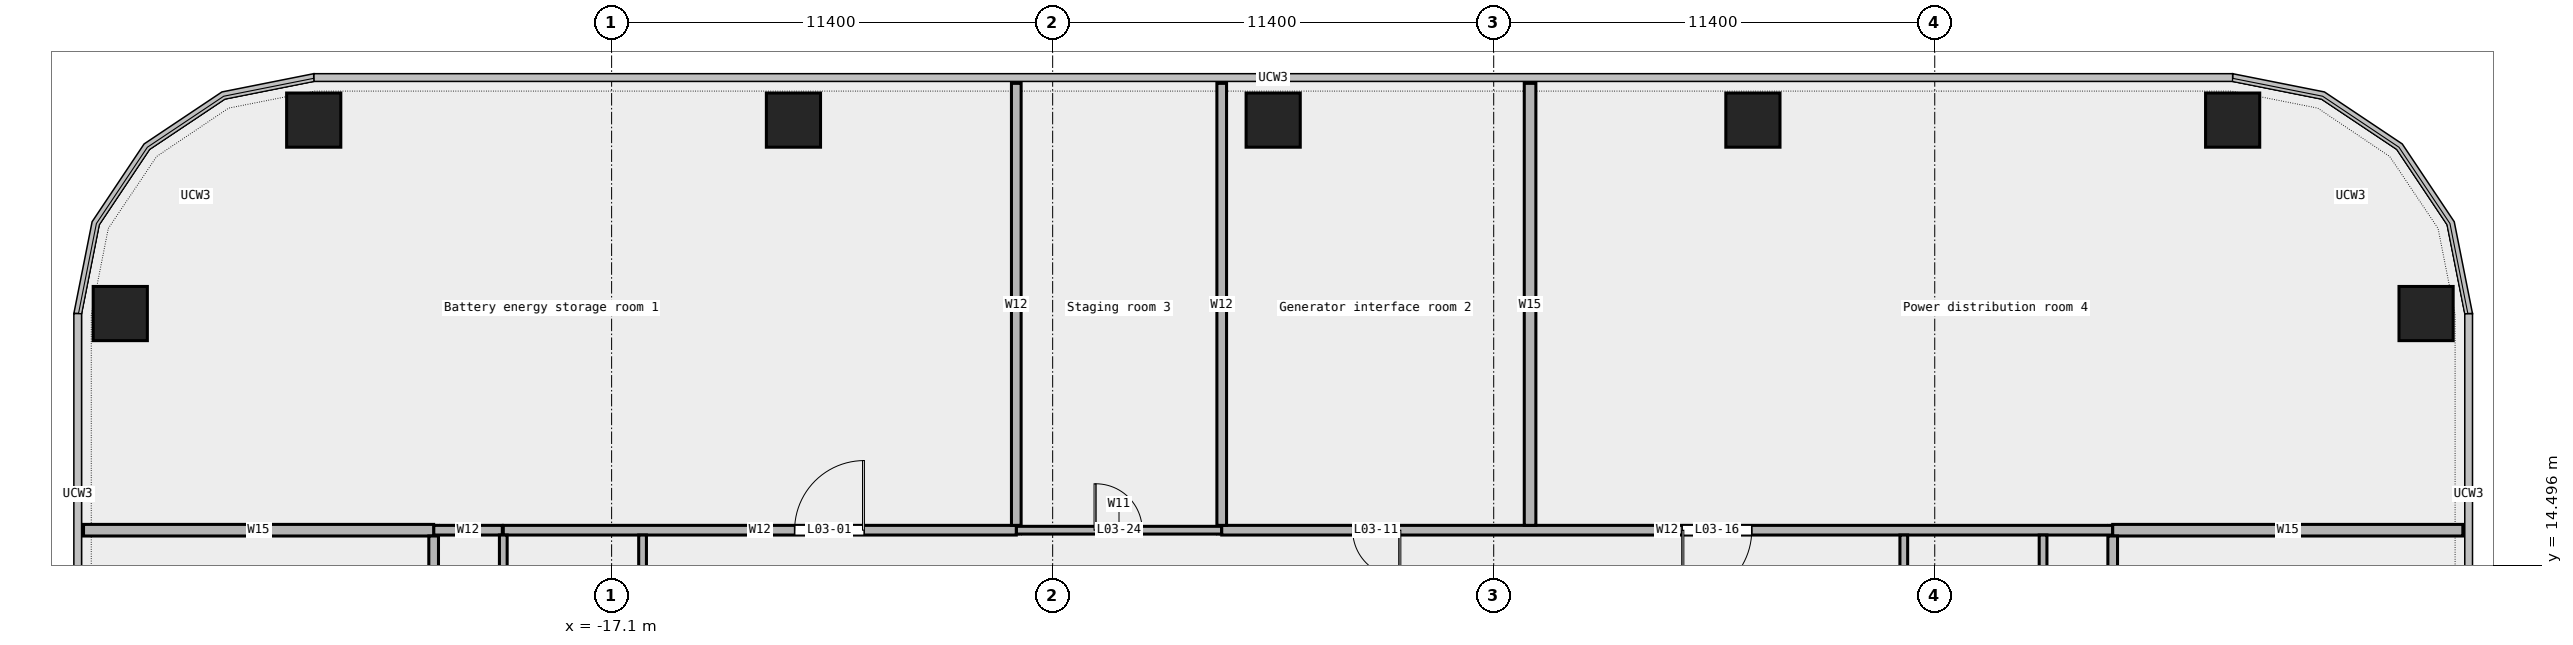
"""IFC4 building model, lengths in metres.
Left out: names, types, materials, properties, quantities, classifications, styles, units other than length and angle.
Written with IfcOpenShell. Run it as: python <this file> out.ifc"""

import sys

from ifc_helpers import new_model, si_unit, direction, frame, frame_2d, origin, origin_2d, place, context, subcontext, project, spatial, rectangle, extrude, element, fill, save


model = new_model("IFC4")
c1 = context("Model", 3, precision=1e-05, world=origin(), true_north=direction((0.0, 1.0)))
c2 = subcontext(c1, "Body", "Model", "MODEL_VIEW")
j1 = project(units=[si_unit("LENGTHUNIT", "METRE"), si_unit("PLANEANGLEUNIT", "RADIAN")], contexts=[c1])
p1 = place(None, origin())
s1 = spatial("IfcSite", under=j1, at=p1, CompositionType="ELEMENT")
p2 = place(p1, origin())
s2 = spatial("IfcBuilding", under=s1, at=p2, CompositionType="ELEMENT")
p3 = place(p2, frame((0.0, 0.0, 20.0)))
s3 = spatial("IfcBuildingStorey", under=s2, at=p3, CompositionType="ELEMENT", Elevation=20.0)
for number, where, z_axis, x_axis in (
    (1, (29.8, 21.0, 0.0), (0.0, 0.0, 1.0), (1.0, 0.0, 0.0)),
    (2, (24.8, 26.0, 0.0), (0.0, 0.0, 1.0), (1.0, 0.0, 0.0)),
    (3, (12.4, 26.0, 0.0), (0.0, 0.0, 1.0), (1.0, 0.0, 0.0)),
    (4, (0.0, 26.0, 0.0), (0.0, 0.0, 1.0), (1.0, 0.0, 0.0)),
    (5, (-12.4, 26.0, 0.0), (0.0, 0.0, 1.0), (1.0, 0.0, 0.0)),
    (6, (-24.8, 26.0, 0.0), (0.0, 0.0, 1.0), (1.0, 0.0, 0.0)),
    (7, (-29.8, 21.0, 0.0), (0.0, 0.0, 1.0), (1.0, 0.0, 0.0)),
):
    element("IfcColumn", number, at=place(p3, frame(where, z_axis=z_axis, x_axis=x_axis)), inside=s3, PredefinedType="COLUMN", context=c2, shape_type="SweptSolid", body=[
        extrude(rectangle(XDim=1.4, YDim=1.4, at=origin_2d()), origin(), (0.0, 0.0, 1.0), 5.0),
    ])
p4 = place(p3, frame((-6.64, 15.4, 0.0), z_axis=(0.0, 0.0, 1.0), x_axis=(1.0, 0.0, 0.0)))
e8 = element("IfcWall", 8, at=p4, inside=s3, PredefinedType="PARTITIONING", context=c2, shape_type="SweptSolid", body=[
    extrude(rectangle(XDim=5.31, YDim=0.2, at=frame_2d((2.655, 0.0))), origin(), (0.0, 0.0, 1.0), 5.0),
])
p5 = place(p4, frame((2.055, 0.0, 0.0)))
e9 = element("IfcOpeningElement", 9, at=p5, cuts=e8, PredefinedType="OPENING", context=c2, shape_type="SweptSolid", body=[
    extrude(rectangle(XDim=1.2, YDim=2.1, at=frame_2d((0.6, 1.05))), frame((0.0, 0.112, 0.0), z_axis=(0.0, -1.0, 0.0), x_axis=(1.0, 0.0, 0.0)), (0.0, 0.0, 1.0), 0.224),
])
p6 = place(p3, frame((-21.7, 15.4, 0.0), z_axis=(0.0, 0.0, 1.0), x_axis=(1.0, 0.0, 0.0)))
e10 = element("IfcWall", 10, at=p6, inside=s3, PredefinedType="PARTITIONING", context=c2, shape_type="SweptSolid", body=[
    extrude(rectangle(XDim=1.775, YDim=0.25, at=frame_2d((0.887, 0.0))), origin(), (0.0, 0.0, 1.0), 5.0),
])
p7 = place(p3, frame((-19.9, 15.4, 0.0), z_axis=(0.0, 0.0, 1.0), x_axis=(1.0, 0.0, 0.0)))
e11 = element("IfcWall", 11, at=p7, inside=s3, PredefinedType="PARTITIONING", context=c2, shape_type="SweptSolid", body=[
    extrude(rectangle(XDim=13.26, YDim=0.25, at=frame_2d((6.63, 0.0))), origin(), (0.0, 0.0, 1.0), 5.0),
])
p8 = place(p7, frame((7.53, 0.0, 0.0)))
e12 = element("IfcOpeningElement", 12, at=p8, cuts=e11, PredefinedType="OPENING", context=c2, shape_type="SweptSolid", body=[
    extrude(rectangle(XDim=1.8, YDim=2.1, at=frame_2d((0.9, 1.05))), frame((0.0, 0.137, 0.0), z_axis=(0.0, -1.0, 0.0), x_axis=(1.0, 0.0, 0.0)), (0.0, 0.0, 1.0), 0.274),
])
p9 = place(p3, frame((-1.33, 15.4, 0.0), z_axis=(0.0, 0.0, 1.0), x_axis=(1.0, 0.0, 0.0)))
e13 = element("IfcWall", 13, at=p9, inside=s3, PredefinedType="PARTITIONING", context=c2, shape_type="SweptSolid", body=[
    extrude(rectangle(XDim=23.03, YDim=0.25, at=frame_2d((11.515, 0.0))), origin(), (0.0, 0.0, 1.0), 5.0),
])
p10 = place(p9, frame((3.385, 0.0, 0.0)))
e14 = element("IfcOpeningElement", 14, at=p10, cuts=e13, PredefinedType="OPENING", context=c2, shape_type="SweptSolid", body=[
    extrude(rectangle(XDim=1.2, YDim=2.1, at=frame_2d((0.6, 1.05))), frame((0.0, 0.137, 0.0), z_axis=(0.0, -1.0, 0.0), x_axis=(1.0, 0.0, 0.0)), (0.0, 0.0, 1.0), 0.274),
])
p11 = place(p9, frame((11.9, 0.0, 0.0)))
e15 = element("IfcOpeningElement", 15, at=p11, cuts=e13, PredefinedType="OPENING", context=c2, shape_type="SweptSolid", body=[
    extrude(rectangle(XDim=1.8, YDim=2.1, at=frame_2d((0.9, 1.05))), frame((0.0, 0.137, 0.0), z_axis=(0.0, -1.0, 0.0), x_axis=(1.0, 0.0, 0.0)), (0.0, 0.0, 1.0), 0.274),
])
for number, where, z_axis, x_axis in (
    (16, (-30.75, 15.4, 0.0), (0.0, 0.0, 1.0), (1.0, 0.0, 0.0)),
    (17, (21.7, 15.4, 0.0), (0.0, 0.0, 1.0), (1.0, 0.0, 0.0)),
):
    element("IfcWall", number, at=place(p3, frame(where, z_axis=z_axis, x_axis=x_axis)), inside=s3, PredefinedType="PARTITIONING", context=c2, shape_type="SweptSolid", body=[
        extrude(rectangle(XDim=9.05, YDim=0.3, at=frame_2d((4.525, 0.0))), origin(), (0.0, 0.0, 1.0), 5.0),
    ])
p12 = place(p3, frame((-21.7, 11.79, 0.0), z_axis=(0.0, 0.0, 1.0), x_axis=(0.0, 1.0, 0.0)))
e18 = element("IfcWall", 18, at=p12, inside=s3, PredefinedType="PARTITIONING", context=c2, shape_type="SweptSolid", body=[
    extrude(rectangle(XDim=3.46, YDim=0.25, at=frame_2d((1.73, 0.0))), origin(), (0.0, 0.0, 1.0), 5.0),
])
p13 = place(p12, frame((1.13, 0.0, 0.0)))
e19 = element("IfcOpeningElement", 19, at=p13, cuts=e18, PredefinedType="OPENING", context=c2, shape_type="SweptSolid", body=[
    extrude(rectangle(XDim=1.2, YDim=2.1, at=frame_2d((0.6, 1.05))), frame((0.0, 0.137, 0.0), z_axis=(0.0, -1.0, 0.0), x_axis=(1.0, 0.0, 0.0)), (0.0, 0.0, 1.0), 0.274),
])
p14 = place(p3, frame((-19.9, 9.85, 0.0), z_axis=(0.0, 0.0, 1.0), x_axis=(0.0, 1.0, 0.0)))
e20 = element("IfcWall", 20, at=p14, inside=s3, PredefinedType="PARTITIONING", context=c2, shape_type="SweptSolid", body=[
    extrude(rectangle(XDim=5.425, YDim=0.2, at=frame_2d((2.712, 0.0))), origin(), (0.0, 0.0, 1.0), 5.0),
])
p15 = place(p3, frame((-16.3, 11.8, 0.0), z_axis=(0.0, 0.0, 1.0), x_axis=(0.0, 1.0, 0.0)))
e21 = element("IfcWall", 21, at=p15, inside=s3, PredefinedType="PARTITIONING", context=c2, shape_type="SweptSolid", body=[
    extrude(rectangle(XDim=3.475, YDim=0.2, at=frame_2d((1.737, 0.0))), origin(), (0.0, 0.0, 1.0), 5.0),
])
p16 = place(p15, frame((1.288, 0.0, 0.0)))
e22 = element("IfcOpeningElement", 22, at=p16, cuts=e21, PredefinedType="OPENING", context=c2, shape_type="SweptSolid", body=[
    extrude(rectangle(XDim=0.9, YDim=2.1, at=frame_2d((0.45, 1.05))), frame((0.0, 0.112, 0.0), z_axis=(0.0, -1.0, 0.0), x_axis=(1.0, 0.0, 0.0)), (0.0, 0.0, 1.0), 0.224),
])
for number, where, z_axis, x_axis in (
    (23, (-6.64, 15.525, 0.0), (0.0, 0.0, 1.0), (0.0, 1.0, 0.0)),
    (24, (-1.33, 15.525, 0.0), (0.0, 0.0, 1.0), (0.0, 1.0, 0.0)),
):
    element("IfcWall", number, at=place(p3, frame(where, z_axis=z_axis, x_axis=x_axis)), inside=s3, PredefinedType="PARTITIONING", context=c2, shape_type="SweptSolid", body=[
        extrude(rectangle(XDim=11.425, YDim=0.25, at=frame_2d((5.712, 0.0))), origin(), (0.0, 0.0, 1.0), 5.0),
    ])
p17 = place(p3, frame((6.64, 15.525, 0.0), z_axis=(0.0, 0.0, 1.0), x_axis=(0.0, 1.0, 0.0)))
e25 = element("IfcWall", 25, at=p17, inside=s3, PredefinedType="PARTITIONING", context=c2, shape_type="SweptSolid", body=[
    extrude(rectangle(XDim=11.425, YDim=0.3, at=frame_2d((5.712, 0.0))), origin(), (0.0, 0.0, 1.0), 5.0),
])
p18 = place(p3, frame((16.3, 11.8, 0.0), z_axis=(0.0, 0.0, 1.0), x_axis=(0.0, 1.0, 0.0)))
e26 = element("IfcWall", 26, at=p18, inside=s3, PredefinedType="PARTITIONING", context=c2, shape_type="SweptSolid", body=[
    extrude(rectangle(XDim=3.475, YDim=0.2, at=frame_2d((1.737, 0.0))), origin(), (0.0, 0.0, 1.0), 5.0),
])
p19 = place(p3, frame((19.9, 9.94, 0.0), z_axis=(0.0, 0.0, 1.0), x_axis=(0.0, 1.0, 0.0)))
e27 = element("IfcWall", 27, at=p19, inside=s3, PredefinedType="PARTITIONING", context=c2, shape_type="SweptSolid", body=[
    extrude(rectangle(XDim=5.335, YDim=0.2, at=frame_2d((2.667, 0.0))), origin(), (0.0, 0.0, 1.0), 5.0),
])
p20 = place(p19, frame((2.218, 0.0, 0.0)))
e28 = element("IfcOpeningElement", 28, at=p20, cuts=e27, PredefinedType="OPENING", context=c2, shape_type="SweptSolid", body=[
    extrude(rectangle(XDim=0.9, YDim=2.1, at=frame_2d((0.45, 1.05))), frame((0.0, 0.112, 0.0), z_axis=(0.0, -1.0, 0.0), x_axis=(1.0, 0.0, 0.0)), (0.0, 0.0, 1.0), 0.224),
])
p21 = place(p3, frame((21.7, 11.79, 0.0), z_axis=(0.0, 0.0, 1.0), x_axis=(0.0, 1.0, 0.0)))
e29 = element("IfcWall", 29, at=p21, inside=s3, PredefinedType="PARTITIONING", context=c2, shape_type="SweptSolid", body=[
    extrude(rectangle(XDim=3.46, YDim=0.25, at=frame_2d((1.73, 0.0))), origin(), (0.0, 0.0, 1.0), 5.0),
])
p22 = place(p21, frame((1.13, 0.0, 0.0)))
e30 = element("IfcOpeningElement", 30, at=p22, cuts=e29, PredefinedType="OPENING", context=c2, shape_type="SweptSolid", body=[
    extrude(rectangle(XDim=1.2, YDim=2.1, at=frame_2d((0.6, 1.05))), frame((0.0, 0.137, 0.0), z_axis=(0.0, -1.0, 0.0), x_axis=(1.0, 0.0, 0.0)), (0.0, 0.0, 1.0), 0.274),
])
p23 = place(p8, origin())
e31 = element("IfcDoor", 31, at=p23, inside=s3, OperationType="DOUBLE_DOOR_SINGLE_SWING", PredefinedType="DOOR", context=c2, shape_type="SweptSolid", body=[
    extrude(rectangle(XDim=1.8, YDim=2.1, at=frame_2d((0.9, 1.05))), frame((0.0, 0.025, 0.0), z_axis=(0.0, -1.0, 0.0), x_axis=(1.0, 0.0, 0.0)), (0.0, 0.0, 1.0), 0.05),
])
fill(e12, e31)
p24 = place(p10, origin())
e32 = element("IfcDoor", 32, at=p24, inside=s3, OperationType="SINGLE_SWING_LEFT", PredefinedType="DOOR", context=c2, shape_type="SweptSolid", body=[
    extrude(rectangle(XDim=1.2, YDim=2.1, at=frame_2d((0.6, 1.05))), frame((0.0, 0.025, 0.0), z_axis=(0.0, -1.0, 0.0), x_axis=(1.0, 0.0, 0.0)), (0.0, 0.0, 1.0), 0.05),
])
fill(e14, e32)
p25 = place(p11, origin())
e33 = element("IfcDoor", 33, at=p25, inside=s3, OperationType="DOUBLE_DOOR_SINGLE_SWING", PredefinedType="DOOR", context=c2, shape_type="SweptSolid", body=[
    extrude(rectangle(XDim=1.8, YDim=2.1, at=frame_2d((0.9, 1.05))), frame((0.0, 0.025, 0.0), z_axis=(0.0, -1.0, 0.0), x_axis=(1.0, 0.0, 0.0)), (0.0, 0.0, 1.0), 0.05),
])
fill(e15, e33)
p26 = place(p5, origin())
e34 = element("IfcDoor", 34, at=p26, inside=s3, OperationType="SINGLE_SWING_LEFT", PredefinedType="DOOR", context=c2, shape_type="SweptSolid", body=[
    extrude(rectangle(XDim=1.2, YDim=2.1, at=frame_2d((0.6, 1.05))), frame((0.0, 0.025, 0.0), z_axis=(0.0, -1.0, 0.0), x_axis=(1.0, 0.0, 0.0)), (0.0, 0.0, 1.0), 0.05),
])
fill(e9, e34)
save(model, sys.argv[1])
